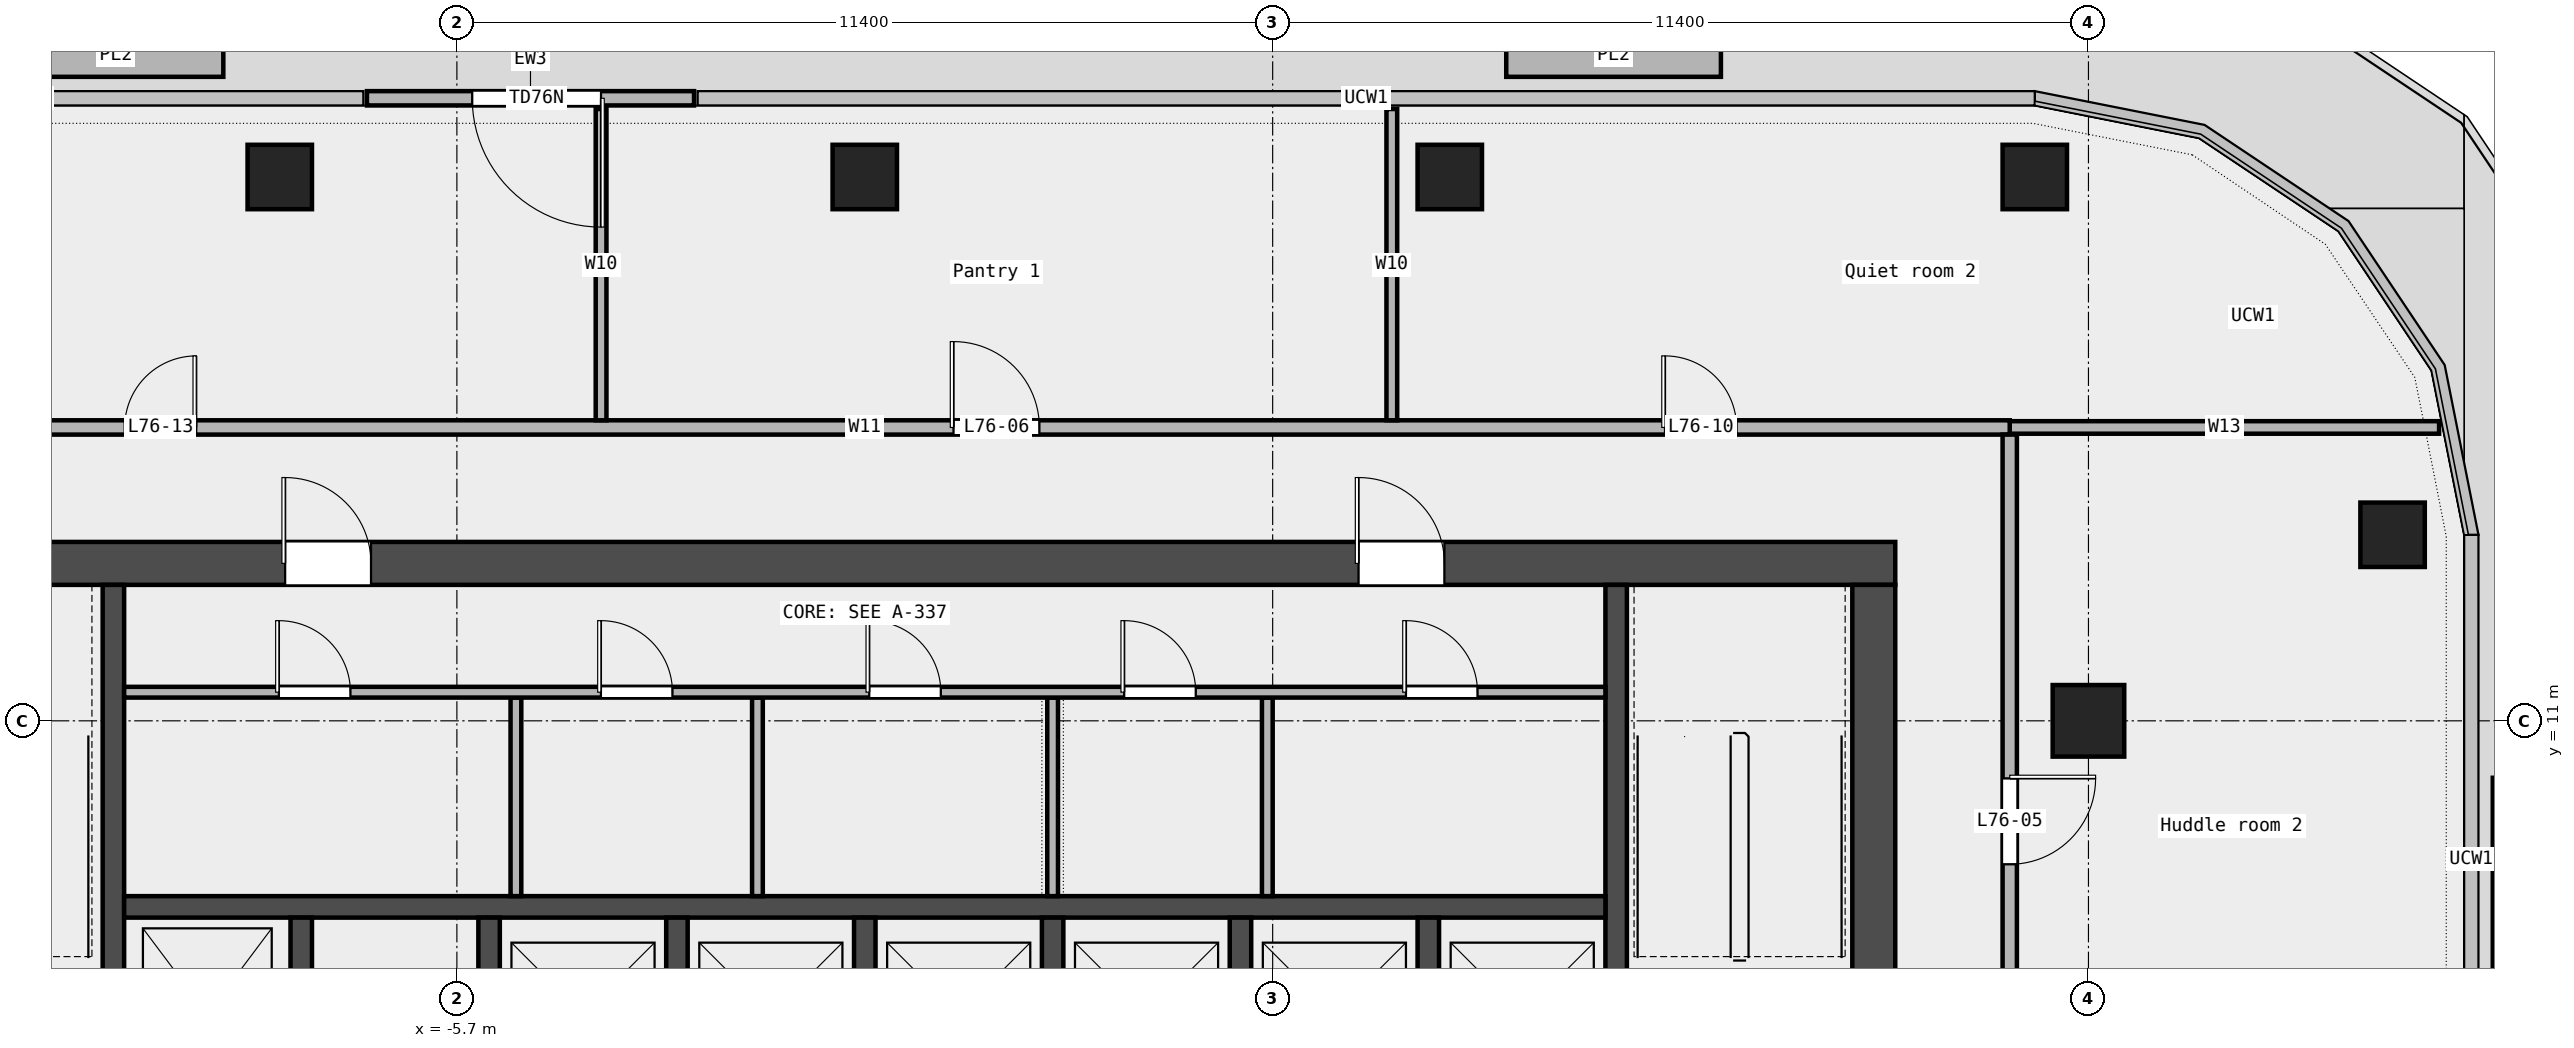
"""IFC4 building model, lengths in metres.
Left out: names, types, materials, properties, quantities, classifications, styles, units other than length and angle.
Written with IfcOpenShell. Run it as: python <this file> out.ifc"""

import sys

from ifc_helpers import new_model, si_unit, direction, frame, frame_2d, origin, origin_2d, place, context, subcontext, project, spatial, rectangle, extrude, element, fill, save


model = new_model("IFC4")
c1 = context("Model", 3, precision=1e-05, world=origin(), true_north=direction((0.0, 1.0)))
c2 = subcontext(c1, "Body", "Model", "MODEL_VIEW")
j1 = project(units=[si_unit("LENGTHUNIT", "METRE"), si_unit("PLANEANGLEUNIT", "RADIAN")], contexts=[c1])
p1 = place(None, origin())
s1 = spatial("IfcSite", under=j1, at=p1, CompositionType="ELEMENT")
p2 = place(p1, origin())
s2 = spatial("IfcBuilding", under=s1, at=p2, CompositionType="ELEMENT")
p3 = place(p2, frame((0.0, 0.0, 349.4)))
s3 = spatial("IfcBuildingStorey", under=s2, at=p3, CompositionType="ELEMENT", Elevation=349.4)
for number, where, z_axis, x_axis in (
    (1, (21.35, 13.6, 0.0), (0.0, 0.0, 1.0), (1.0, 0.0, 0.0)),
    (2, (16.35, 18.6, 0.0), (0.0, 0.0, 1.0), (1.0, 0.0, 0.0)),
    (3, (8.175, 18.6, 0.0), (0.0, 0.0, 1.0), (1.0, 0.0, 0.0)),
    (4, (0.0, 18.6, 0.0), (0.0, 0.0, 1.0), (1.0, 0.0, 0.0)),
    (5, (-8.175, 18.6, 0.0), (0.0, 0.0, 1.0), (1.0, 0.0, 0.0)),
):
    element("IfcColumn", number, at=place(p3, frame(where, z_axis=z_axis, x_axis=x_axis)), inside=s3, PredefinedType="COLUMN", context=c2, shape_type="SweptSolid", body=[
        extrude(rectangle(XDim=0.9, YDim=0.9, at=origin_2d()), origin(), (0.0, 0.0, 1.0), 3.65),
    ])
p4 = place(p3, frame((17.1, 11.0, 0.0), z_axis=(0.0, 0.0, 1.0), x_axis=(1.0, 0.0, 0.0)))
e6 = element("IfcColumn", 6, at=p4, inside=s3, PredefinedType="COLUMN", context=c2, shape_type="SweptSolid", body=[
    extrude(rectangle(XDim=1.0, YDim=1.0, at=origin_2d()), origin(), (0.0, 0.0, 1.0), 3.65),
])
p5 = place(p3, frame((-2.386, 19.7, 0.0), z_axis=(0.0, 0.0, 1.0), x_axis=(-1.0, 0.0, 0.0)))
e7 = element("IfcWall", 7, at=p5, inside=s3, PredefinedType="STANDARD", context=c2, shape_type="SweptSolid", body=[
    extrude(rectangle(XDim=4.571, YDim=0.2, at=frame_2d((2.286, 0.0))), origin(), (0.0, 0.0, 1.0), 3.65),
])
p6 = place(p5, frame((1.3, 0.0, 0.0)))
e8 = element("IfcOpeningElement", 8, at=p6, cuts=e7, PredefinedType="OPENING", context=c2, shape_type="SweptSolid", body=[
    extrude(rectangle(XDim=1.8, YDim=2.4, at=frame_2d((0.9, 1.2))), frame((0.0, 0.112, 0.0), z_axis=(0.0, -1.0, 0.0), x_axis=(1.0, 0.0, 0.0)), (0.0, 0.0, 1.0), 0.224),
])
for number, where, z_axis, x_axis in (
    (9, (23.05, 7.204, 0.0), (0.0, 0.0, 1.0), (0.0, 1.0, 0.0)),
    (10, (11.964, 20.3, 0.0), (0.0, 0.0, 1.0), (-1.0, 0.0, 0.0)),
    (11, (-8.964, 20.3, 0.0), (0.0, 0.0, 1.0), (-1.0, 0.0, 0.0)),
):
    element("IfcWall", number, at=place(p3, frame(where, z_axis=z_axis, x_axis=x_axis)), inside=s3, PredefinedType="STANDARD", context=c2, shape_type="SweptSolid", body=[
        extrude(rectangle(XDim=3.0, YDim=0.6, at=frame_2d((1.5, 0.0))), origin(), (0.0, 0.0, 1.0), 0.7),
    ])
p7 = place(p3, frame((16.0, 15.1, 0.0), z_axis=(0.0, 0.0, 1.0), x_axis=(1.0, 0.0, 0.0)))
e12 = element("IfcWall", 12, at=p7, inside=s3, PredefinedType="PARTITIONING", context=c2, shape_type="SweptSolid", body=[
    extrude(rectangle(XDim=6.0, YDim=0.175, at=frame_2d((3.0, 0.0))), origin(), (0.0, 0.0, 1.0), 3.65),
])
p8 = place(p3, frame((-16.0, 15.1, 0.0), z_axis=(0.0, 0.0, 1.0), x_axis=(1.0, 0.0, 0.0)))
e13 = element("IfcWall", 13, at=p8, inside=s3, PredefinedType="PARTITIONING", context=c2, shape_type="SweptSolid", body=[
    extrude(rectangle(XDim=32.0, YDim=0.2, at=frame_2d((16.0, 0.0))), origin(), (0.0, 0.0, 1.0), 3.65),
])
p9 = place(p8, frame((17.24, 0.0, 0.0)))
e14 = element("IfcOpeningElement", 14, at=p9, cuts=e13, PredefinedType="OPENING", context=c2, shape_type="SweptSolid", body=[
    extrude(rectangle(XDim=1.2, YDim=2.1, at=frame_2d((0.6, 1.05))), frame((0.0, 0.112, 0.0), z_axis=(0.0, -1.0, 0.0), x_axis=(1.0, 0.0, 0.0)), (0.0, 0.0, 1.0), 0.224),
])
p10 = place(p8, frame((27.183, 0.0, 0.0)))
e15 = element("IfcOpeningElement", 15, at=p10, cuts=e13, PredefinedType="OPENING", context=c2, shape_type="SweptSolid", body=[
    extrude(rectangle(XDim=1.0, YDim=2.1, at=frame_2d((0.5, 1.05))), frame((0.0, 0.112, 0.0), z_axis=(0.0, -1.0, 0.0), x_axis=(1.0, 0.0, 0.0)), (0.0, 0.0, 1.0), 0.224),
])
p11 = place(p8, frame((5.657, 0.0, 0.0)))
e16 = element("IfcOpeningElement", 16, at=p11, cuts=e13, PredefinedType="OPENING", context=c2, shape_type="SweptSolid", body=[
    extrude(rectangle(XDim=1.0, YDim=2.1, at=frame_2d((0.5, 1.05))), frame((0.0, 0.112, 0.0), z_axis=(0.0, -1.0, 0.0), x_axis=(1.0, 0.0, 0.0)), (0.0, 0.0, 1.0), 0.224),
])
for number, where, z_axis, x_axis in (
    (17, (-3.685, 15.2, 0.0), (0.0, 0.0, 1.0), (0.0, 1.0, 0.0)),
    (18, (7.365, 15.2, 0.0), (0.0, 0.0, 1.0), (0.0, 1.0, 0.0)),
):
    element("IfcWall", number, at=place(p3, frame(where, z_axis=z_axis, x_axis=x_axis)), inside=s3, PredefinedType="PARTITIONING", context=c2, shape_type="SweptSolid", body=[
        extrude(rectangle(XDim=4.35, YDim=0.15, at=frame_2d((2.175, 0.0))), origin(), (0.0, 0.0, 1.0), 3.65),
    ])
p12 = place(p3, frame((16.0, -8.7, 0.0), z_axis=(0.0, 0.0, 1.0), x_axis=(0.0, 1.0, 0.0)))
e19 = element("IfcWall", 19, at=p12, inside=s3, PredefinedType="PARTITIONING", context=c2, shape_type="SweptSolid", body=[
    extrude(rectangle(XDim=23.7, YDim=0.2, at=frame_2d((11.85, 0.0))), origin(), (0.0, 0.0, 1.0), 3.65),
])
p13 = place(p12, frame((17.695, 0.0, 0.0)))
e20 = element("IfcOpeningElement", 20, at=p13, cuts=e19, PredefinedType="OPENING", context=c2, shape_type="SweptSolid", body=[
    extrude(rectangle(XDim=1.2, YDim=2.1, at=frame_2d((0.6, 1.05))), frame((0.0, 0.112, 0.0), z_axis=(0.0, -1.0, 0.0), x_axis=(1.0, 0.0, 0.0)), (0.0, 0.0, 1.0), 0.224),
])
p14 = place(p12, frame((9.383, 0.0, 0.0)))
e21 = element("IfcOpeningElement", 21, at=p14, cuts=e19, PredefinedType="OPENING", context=c2, shape_type="SweptSolid", body=[
    extrude(rectangle(XDim=1.2, YDim=2.1, at=frame_2d((0.6, 1.05))), frame((0.0, 0.112, 0.0), z_axis=(0.0, -1.0, 0.0), x_axis=(1.0, 0.0, 0.0)), (0.0, 0.0, 1.0), 0.224),
])
p15 = place(p12, frame((2.488, 0.0, 0.0)))
e22 = element("IfcOpeningElement", 22, at=p15, cuts=e19, PredefinedType="OPENING", context=c2, shape_type="SweptSolid", body=[
    extrude(rectangle(XDim=0.9, YDim=2.1, at=frame_2d((0.45, 1.05))), frame((0.0, 0.112, 0.0), z_axis=(0.0, -1.0, 0.0), x_axis=(1.0, 0.0, 0.0)), (0.0, 0.0, 1.0), 0.224),
])
p16 = place(p3, frame((-14.4, 13.2, 0.0), z_axis=(0.0, 0.0, 1.0), x_axis=(1.0, 0.0, 0.0)))
e23 = element("IfcWall", 23, at=p16, inside=s3, PredefinedType="SHEAR", context=c2, shape_type="SweptSolid", body=[
    extrude(rectangle(XDim=28.8, YDim=0.6, at=frame_2d((14.4, 0.0))), origin(), (0.0, 0.0, 1.0), 3.7),
])
p17 = place(p16, frame((6.3, 0.0, 0.0)))
e24 = element("IfcOpeningElement", 24, at=p17, cuts=e23, PredefinedType="OPENING", context=c2, shape_type="SweptSolid", body=[
    extrude(rectangle(XDim=1.2, YDim=2.1, at=frame_2d((0.6, 1.05))), frame((0.0, 0.312, 0.0), z_axis=(0.0, -1.0, 0.0), x_axis=(1.0, 0.0, 0.0)), (0.0, 0.0, 1.0), 0.624),
])
p18 = place(p16, frame((21.3, 0.0, 0.0)))
e25 = element("IfcOpeningElement", 25, at=p18, cuts=e23, PredefinedType="OPENING", context=c2, shape_type="SweptSolid", body=[
    extrude(rectangle(XDim=1.2, YDim=2.1, at=frame_2d((0.6, 1.05))), frame((0.0, 0.312, 0.0), z_axis=(0.0, -1.0, 0.0), x_axis=(1.0, 0.0, 0.0)), (0.0, 0.0, 1.0), 0.624),
])
p19 = place(p3, frame((14.1, -6.6, 0.0), z_axis=(0.0, 0.0, 1.0), x_axis=(0.0, 1.0, 0.0)))
e26 = element("IfcWall", 26, at=p19, inside=s3, PredefinedType="SHEAR", context=c2, shape_type="SweptSolid", body=[
    extrude(rectangle(XDim=19.5, YDim=0.6, at=frame_2d((9.75, 0.0))), origin(), (0.0, 0.0, 1.0), 3.7),
])
p20 = place(p19, frame((9.3, 0.0, 0.0)))
e27 = element("IfcOpeningElement", 27, at=p20, cuts=e26, PredefinedType="OPENING", context=c2, shape_type="SweptSolid", body=[
    extrude(rectangle(XDim=1.8, YDim=2.1, at=frame_2d((0.9, 1.05))), frame((0.0, 0.312, 0.0), z_axis=(0.0, -1.0, 0.0), x_axis=(1.0, 0.0, 0.0)), (0.0, 0.0, 1.0), 0.624),
])
for number, where, z_axis, x_axis in (
    (28, (-10.5, 5.25, 0.0), (0.0, 0.0, 1.0), (0.0, 1.0, 0.0)),
    (29, (10.5, 5.25, 0.0), (0.0, 0.0, 1.0), (0.0, 1.0, 0.0)),
):
    element("IfcWall", number, at=place(p3, frame(where, z_axis=z_axis, x_axis=x_axis)), inside=s3, PredefinedType="SHEAR", context=c2, shape_type="SweptSolid", body=[
        extrude(rectangle(XDim=7.65, YDim=0.3, at=frame_2d((3.825, 0.0))), origin(), (0.0, 0.0, 1.0), 3.7),
    ])
p21 = place(p3, frame((-10.35, 8.4, 0.0), z_axis=(0.0, 0.0, 1.0), x_axis=(1.0, 0.0, 0.0)))
e30 = element("IfcWall", 30, at=p21, inside=s3, PredefinedType="SOLIDWALL", context=c2, shape_type="SweptSolid", body=[
    extrude(rectangle(XDim=20.7, YDim=0.3, at=frame_2d((10.35, 0.0))), origin(), (0.0, 0.0, 1.0), 3.7),
])
for number, where, z_axis, x_axis in (
    (31, (-7.875, 5.55, 0.0), (0.0, 0.0, 1.0), (0.0, 1.0, 0.0)),
    (32, (-5.25, 5.55, 0.0), (0.0, 0.0, 1.0), (0.0, 1.0, 0.0)),
    (33, (-2.625, 5.55, 0.0), (0.0, 0.0, 1.0), (0.0, 1.0, 0.0)),
    (34, (0.0, 5.55, 0.0), (0.0, 0.0, 1.0), (0.0, 1.0, 0.0)),
    (35, (2.625, 5.55, 0.0), (0.0, 0.0, 1.0), (0.0, 1.0, 0.0)),
    (36, (5.25, 5.55, 0.0), (0.0, 0.0, 1.0), (0.0, 1.0, 0.0)),
    (37, (7.875, 5.55, 0.0), (0.0, 0.0, 1.0), (0.0, 1.0, 0.0)),
):
    element("IfcWall", number, at=place(p3, frame(where, z_axis=z_axis, x_axis=x_axis)), inside=s3, PredefinedType="SOLIDWALL", context=c2, shape_type="SweptSolid", body=[
        extrude(rectangle(XDim=2.7, YDim=0.3, at=frame_2d((1.35, 0.0))), origin(), (0.0, 0.0, 1.0), 3.7),
    ])
for number, where, z_axis, x_axis in (
    (38, (-4.875, 8.55, 0.0), (0.0, 0.0, 1.0), (0.0, 1.0, 0.0)),
    (39, (-1.5, 8.55, 0.0), (0.0, 0.0, 1.0), (0.0, 1.0, 0.0)),
    (40, (2.625, 8.55, 0.0), (0.0, 0.0, 1.0), (0.0, 1.0, 0.0)),
    (41, (5.625, 8.55, 0.0), (0.0, 0.0, 1.0), (0.0, 1.0, 0.0)),
):
    element("IfcWall", number, at=place(p3, frame(where, z_axis=z_axis, x_axis=x_axis)), inside=s3, PredefinedType="PARTITIONING", context=c2, shape_type="SweptSolid", body=[
        extrude(rectangle(XDim=2.775, YDim=0.15, at=frame_2d((1.387, 0.0))), origin(), (0.0, 0.0, 1.0), 3.7),
    ])
p22 = place(p3, frame((-10.35, 11.4, 0.0), z_axis=(0.0, 0.0, 1.0), x_axis=(1.0, 0.0, 0.0)))
e42 = element("IfcWall", 42, at=p22, inside=s3, PredefinedType="PARTITIONING", context=c2, shape_type="SweptSolid", body=[
    extrude(rectangle(XDim=20.7, YDim=0.15, at=frame_2d((10.35, 0.0))), origin(), (0.0, 0.0, 1.0), 3.7),
])
p23 = place(p22, frame((2.163, 0.0, 0.0)))
e43 = element("IfcOpeningElement", 43, at=p23, cuts=e42, PredefinedType="OPENING", context=c2, shape_type="SweptSolid", body=[
    extrude(rectangle(XDim=1.0, YDim=2.1, at=frame_2d((0.5, 1.05))), frame((0.0, 0.087, 0.0), z_axis=(0.0, -1.0, 0.0), x_axis=(1.0, 0.0, 0.0)), (0.0, 0.0, 1.0), 0.174),
])
p24 = place(p22, frame((6.663, 0.0, 0.0)))
e44 = element("IfcOpeningElement", 44, at=p24, cuts=e42, PredefinedType="OPENING", context=c2, shape_type="SweptSolid", body=[
    extrude(rectangle(XDim=1.0, YDim=2.1, at=frame_2d((0.5, 1.05))), frame((0.0, 0.087, 0.0), z_axis=(0.0, -1.0, 0.0), x_axis=(1.0, 0.0, 0.0)), (0.0, 0.0, 1.0), 0.174),
])
p25 = place(p22, frame((10.413, 0.0, 0.0)))
e45 = element("IfcOpeningElement", 45, at=p25, cuts=e42, PredefinedType="OPENING", context=c2, shape_type="SweptSolid", body=[
    extrude(rectangle(XDim=1.0, YDim=2.1, at=frame_2d((0.5, 1.05))), frame((0.0, 0.087, 0.0), z_axis=(0.0, -1.0, 0.0), x_axis=(1.0, 0.0, 0.0)), (0.0, 0.0, 1.0), 0.174),
])
p26 = place(p22, frame((13.975, 0.0, 0.0)))
e46 = element("IfcOpeningElement", 46, at=p26, cuts=e42, PredefinedType="OPENING", context=c2, shape_type="SweptSolid", body=[
    extrude(rectangle(XDim=1.0, YDim=2.1, at=frame_2d((0.5, 1.05))), frame((0.0, 0.087, 0.0), z_axis=(0.0, -1.0, 0.0), x_axis=(1.0, 0.0, 0.0)), (0.0, 0.0, 1.0), 0.174),
])
p27 = place(p22, frame((17.913, 0.0, 0.0)))
e47 = element("IfcOpeningElement", 47, at=p27, cuts=e42, PredefinedType="OPENING", context=c2, shape_type="SweptSolid", body=[
    extrude(rectangle(XDim=1.0, YDim=2.1, at=frame_2d((0.5, 1.05))), frame((0.0, 0.087, 0.0), z_axis=(0.0, -1.0, 0.0), x_axis=(1.0, 0.0, 0.0)), (0.0, 0.0, 1.0), 0.174),
])
p28 = place(p6, origin())
e48 = element("IfcDoor", 48, at=p28, inside=s3, OperationType="DOUBLE_DOOR_SINGLE_SWING", PredefinedType="DOOR", context=c2, shape_type="SweptSolid", body=[
    extrude(rectangle(XDim=1.8, YDim=2.4, at=frame_2d((0.9, 1.2))), frame((0.0, 0.025, 0.0), z_axis=(0.0, -1.0, 0.0), x_axis=(1.0, 0.0, 0.0)), (0.0, 0.0, 1.0), 0.05),
])
fill(e8, e48)
p29 = place(p13, origin())
e49 = element("IfcDoor", 49, at=p29, inside=s3, OperationType="SINGLE_SWING_LEFT", PredefinedType="DOOR", context=c2, shape_type="SweptSolid", body=[
    extrude(rectangle(XDim=1.2, YDim=2.1, at=frame_2d((0.6, 1.05))), frame((0.0, 0.025, 0.0), z_axis=(0.0, -1.0, 0.0), x_axis=(1.0, 0.0, 0.0)), (0.0, 0.0, 1.0), 0.05),
])
fill(e20, e49)
p30 = place(p9, origin())
e50 = element("IfcDoor", 50, at=p30, inside=s3, OperationType="SINGLE_SWING_LEFT", PredefinedType="DOOR", context=c2, shape_type="SweptSolid", body=[
    extrude(rectangle(XDim=1.2, YDim=2.1, at=frame_2d((0.6, 1.05))), frame((0.0, 0.025, 0.0), z_axis=(0.0, -1.0, 0.0), x_axis=(1.0, 0.0, 0.0)), (0.0, 0.0, 1.0), 0.05),
])
fill(e14, e50)
p31 = place(p10, origin())
e51 = element("IfcDoor", 51, at=p31, inside=s3, OperationType="SINGLE_SWING_LEFT", PredefinedType="DOOR", context=c2, shape_type="SweptSolid", body=[
    extrude(rectangle(XDim=1.0, YDim=2.1, at=frame_2d((0.5, 1.05))), frame((0.0, 0.025, 0.0), z_axis=(0.0, -1.0, 0.0), x_axis=(1.0, 0.0, 0.0)), (0.0, 0.0, 1.0), 0.05),
])
fill(e15, e51)
p32 = place(p11, origin())
e52 = element("IfcDoor", 52, at=p32, inside=s3, OperationType="SINGLE_SWING_RIGHT", PredefinedType="DOOR", context=c2, shape_type="SweptSolid", body=[
    extrude(rectangle(XDim=1.0, YDim=2.1, at=frame_2d((0.5, 1.05))), frame((0.0, 0.025, 0.0), z_axis=(0.0, -1.0, 0.0), x_axis=(1.0, 0.0, 0.0)), (0.0, 0.0, 1.0), 0.05),
])
fill(e16, e52)
p33 = place(p23, origin())
e53 = element("IfcDoor", 53, at=p33, inside=s3, OperationType="SINGLE_SWING_LEFT", PredefinedType="DOOR", context=c2, shape_type="SweptSolid", body=[
    extrude(rectangle(XDim=1.0, YDim=2.1, at=frame_2d((0.5, 1.05))), frame((0.0, 0.025, 0.0), z_axis=(0.0, -1.0, 0.0), x_axis=(1.0, 0.0, 0.0)), (0.0, 0.0, 1.0), 0.05),
])
fill(e43, e53)
p34 = place(p24, origin())
e54 = element("IfcDoor", 54, at=p34, inside=s3, OperationType="SINGLE_SWING_LEFT", PredefinedType="DOOR", context=c2, shape_type="SweptSolid", body=[
    extrude(rectangle(XDim=1.0, YDim=2.1, at=frame_2d((0.5, 1.05))), frame((0.0, 0.025, 0.0), z_axis=(0.0, -1.0, 0.0), x_axis=(1.0, 0.0, 0.0)), (0.0, 0.0, 1.0), 0.05),
])
fill(e44, e54)
p35 = place(p25, origin())
e55 = element("IfcDoor", 55, at=p35, inside=s3, OperationType="SINGLE_SWING_LEFT", PredefinedType="DOOR", context=c2, shape_type="SweptSolid", body=[
    extrude(rectangle(XDim=1.0, YDim=2.1, at=frame_2d((0.5, 1.05))), frame((0.0, 0.025, 0.0), z_axis=(0.0, -1.0, 0.0), x_axis=(1.0, 0.0, 0.0)), (0.0, 0.0, 1.0), 0.05),
])
fill(e45, e55)
p36 = place(p26, origin())
e56 = element("IfcDoor", 56, at=p36, inside=s3, OperationType="SINGLE_SWING_LEFT", PredefinedType="DOOR", context=c2, shape_type="SweptSolid", body=[
    extrude(rectangle(XDim=1.0, YDim=2.1, at=frame_2d((0.5, 1.05))), frame((0.0, 0.025, 0.0), z_axis=(0.0, -1.0, 0.0), x_axis=(1.0, 0.0, 0.0)), (0.0, 0.0, 1.0), 0.05),
])
fill(e46, e56)
p37 = place(p27, origin())
e57 = element("IfcDoor", 57, at=p37, inside=s3, OperationType="SINGLE_SWING_LEFT", PredefinedType="DOOR", context=c2, shape_type="SweptSolid", body=[
    extrude(rectangle(XDim=1.0, YDim=2.1, at=frame_2d((0.5, 1.05))), frame((0.0, 0.025, 0.0), z_axis=(0.0, -1.0, 0.0), x_axis=(1.0, 0.0, 0.0)), (0.0, 0.0, 1.0), 0.05),
])
fill(e47, e57)
p38 = place(p17, origin())
e58 = element("IfcDoor", 58, at=p38, inside=s3, OperationType="SINGLE_SWING_LEFT", PredefinedType="DOOR", context=c2, shape_type="SweptSolid", body=[
    extrude(rectangle(XDim=1.2, YDim=2.1, at=frame_2d((0.6, 1.05))), frame((0.0, 0.025, 0.0), z_axis=(0.0, -1.0, 0.0), x_axis=(1.0, 0.0, 0.0)), (0.0, 0.0, 1.0), 0.05),
])
fill(e24, e58)
p39 = place(p18, origin())
e59 = element("IfcDoor", 59, at=p39, inside=s3, OperationType="SINGLE_SWING_RIGHT", PredefinedType="DOOR", context=c2, shape_type="SweptSolid", body=[
    extrude(rectangle(XDim=1.2, YDim=2.1, at=frame_2d((0.6, 1.05))), frame((0.0, 0.025, 0.0), z_axis=(0.0, -1.0, 0.0), x_axis=(1.0, 0.0, 0.0)), (0.0, 0.0, 1.0), 0.05),
])
fill(e25, e59)
save(model, sys.argv[1])
